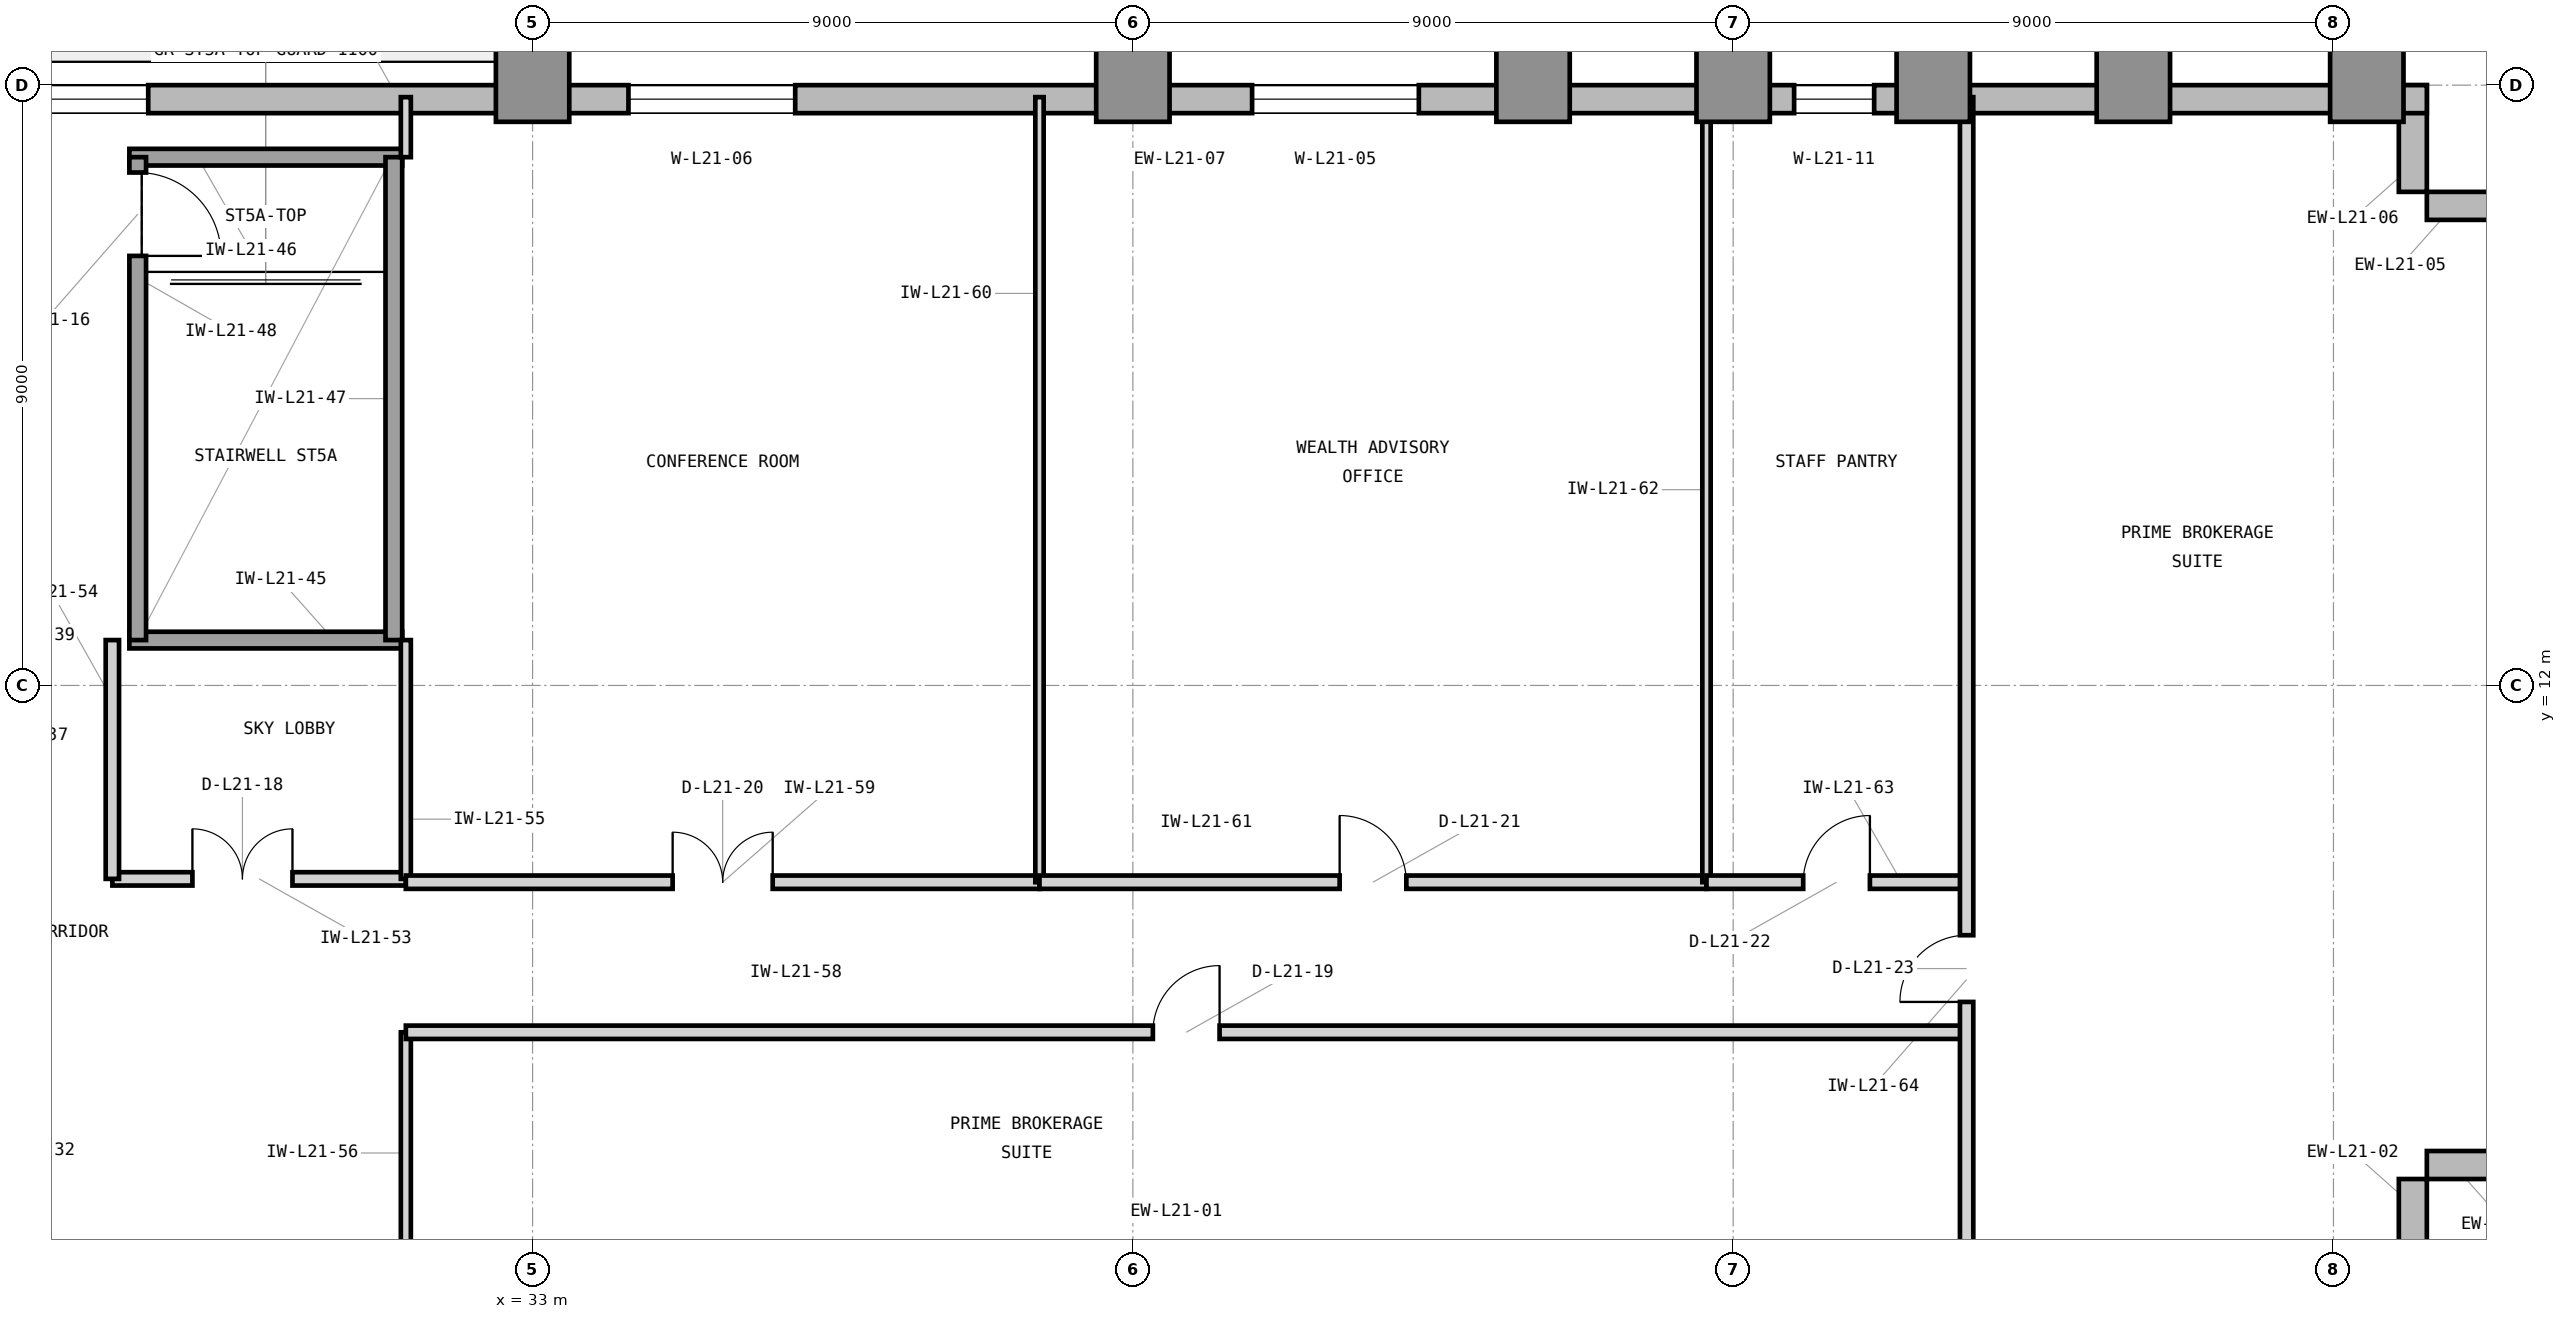
"""IFC4 building model, lengths in metres.
Left out: names, types, materials, properties, quantities, classifications, styles, units other than length and angle.
Written with IfcOpenShell. Run it as: python <this file> out.ifc"""

import sys

from ifc_helpers import new_model, si_unit, direction, frame, frame_2d, origin, origin_2d, place, context, subcontext, project, spatial, rectangle, extrude, element, fill, save


model = new_model("IFC4")
c1 = context("Model", 3, precision=1e-05, world=origin(), true_north=direction((0.0, 1.0)))
c2 = subcontext(c1, "Body", "Model", "MODEL_VIEW")
j1 = project(units=[si_unit("LENGTHUNIT", "METRE"), si_unit("PLANEANGLEUNIT", "RADIAN")], contexts=[c1])
p1 = place(None, origin())
s1 = spatial("IfcSite", under=j1, at=p1, CompositionType="ELEMENT")
p2 = place(p1, origin())
s2 = spatial("IfcBuilding", under=s1, at=p2, CompositionType="ELEMENT")
p3 = place(p2, frame((0.0, 0.0, 93.3)))
s3 = spatial("IfcBuildingStorey", under=s2, at=p3, CompositionType="ELEMENT", Elevation=93.3)
for number, where, z_axis, x_axis in (
    (1, (33.0, 21.0, 0.0), (0.0, 0.0, 1.0), (1.0, 0.0, 0.0)),
    (2, (42.0, 21.0, 0.0), (0.0, 0.0, 1.0), (1.0, 0.0, 0.0)),
    (3, (48.0, 21.0, 0.0), (0.0, 0.0, 1.0), (1.0, 0.0, 0.0)),
    (4, (51.0, 21.0, 0.0), (0.0, 0.0, 1.0), (1.0, 0.0, 0.0)),
    (5, (54.0, 21.0, 0.0), (0.0, 0.0, 1.0), (1.0, 0.0, 0.0)),
    (6, (57.0, 21.0, 0.0), (0.0, 0.0, 1.0), (1.0, 0.0, 0.0)),
    (7, (60.5, 21.0, 0.0), (0.0, 0.0, 1.0), (1.0, 0.0, 0.0)),
):
    element("IfcColumn", number, at=place(p3, frame(where, z_axis=z_axis, x_axis=x_axis)), inside=s3, PredefinedType="COLUMN", context=c2, shape_type="SweptSolid", body=[
        extrude(rectangle(XDim=1.1, YDim=1.1, at=origin_2d()), origin(), (0.0, 0.0, 1.0), 3.9),
    ])
for number, where, z_axis, x_axis in (
    (8, (61.19, 3.0, 0.0), (0.0, 0.0, 1.0), (0.0, 1.0, 0.0)),
    (9, (61.4, 4.81, 0.0), (0.0, 0.0, 1.0), (1.0, 0.0, 0.0)),
    (10, (63.0, 19.19, 0.0), (0.0, 0.0, 1.0), (-1.0, 0.0, 0.0)),
    (11, (61.19, 19.4, 0.0), (0.0, 0.0, 1.0), (0.0, 1.0, 0.0)),
):
    element("IfcWall", number, at=place(p3, frame(where, z_axis=z_axis, x_axis=x_axis)), inside=s3, PredefinedType="STANDARD", context=c2, shape_type="SweptSolid", body=[
        extrude(rectangle(XDim=1.6, YDim=0.42, at=frame_2d((0.8, 0.0))), origin(), (0.0, 0.0, 1.0), 3.7),
    ])
p4 = place(p3, frame((61.4, 20.79, 0.0), z_axis=(0.0, 0.0, 1.0), x_axis=(-1.0, 0.0, 0.0)))
e12 = element("IfcWall", 12, at=p4, inside=s3, PredefinedType="STANDARD", context=c2, shape_type="SweptSolid", body=[
    extrude(rectangle(XDim=37.4, YDim=0.42, at=frame_2d((18.7, 0.0))), origin(), (0.0, 0.0, 1.0), 3.7),
])
p5 = place(p4, frame((15.113, 0.0, 0.85)))
e13 = element("IfcOpeningElement", 13, at=p5, cuts=e12, PredefinedType="OPENING", context=c2, shape_type="SweptSolid", body=[
    extrude(rectangle(XDim=2.5, YDim=2.25, at=frame_2d((1.25, 1.125))), frame((0.0, 0.22, 0.0), z_axis=(0.0, -1.0, 0.0), x_axis=(1.0, 0.0, 0.0)), (0.0, 0.0, 1.0), 0.44),
])
p6 = place(p4, frame((24.462, 0.0, 0.85)))
e14 = element("IfcOpeningElement", 14, at=p6, cuts=e12, PredefinedType="OPENING", context=c2, shape_type="SweptSolid", body=[
    extrude(rectangle(XDim=2.5, YDim=2.25, at=frame_2d((1.25, 1.125))), frame((0.0, 0.22, 0.0), z_axis=(0.0, -1.0, 0.0), x_axis=(1.0, 0.0, 0.0)), (0.0, 0.0, 1.0), 0.44),
])
p7 = place(p4, frame((34.163, 0.0, 0.85)))
e15 = element("IfcOpeningElement", 15, at=p7, cuts=e12, PredefinedType="OPENING", context=c2, shape_type="SweptSolid", body=[
    extrude(rectangle(XDim=1.8, YDim=2.25, at=frame_2d((0.9, 1.125))), frame((0.0, 0.22, 0.0), z_axis=(0.0, -1.0, 0.0), x_axis=(1.0, 0.0, 0.0)), (0.0, 0.0, 1.0), 0.44),
])
p8 = place(p4, frame((8.286, 0.0, 0.85)))
e16 = element("IfcOpeningElement", 16, at=p8, cuts=e12, PredefinedType="OPENING", context=c2, shape_type="SweptSolid", body=[
    extrude(rectangle(XDim=1.2, YDim=2.25, at=frame_2d((0.6, 1.125))), frame((0.0, 0.22, 0.0), z_axis=(0.0, -1.0, 0.0), x_axis=(1.0, 0.0, 0.0)), (0.0, 0.0, 1.0), 0.44),
])
for number, where, z_axis, x_axis in (
    (17, (26.955, 12.68, 0.0), (0.0, 0.0, 1.0), (1.0, 0.0, 0.0)),
    (18, (26.955, 19.92, 0.0), (0.0, 0.0, 1.0), (1.0, 0.0, 0.0)),
):
    element("IfcWall", number, at=place(p3, frame(where, z_axis=z_axis, x_axis=x_axis)), inside=s3, PredefinedType="SHEAR", context=c2, shape_type="SweptSolid", body=[
        extrude(rectangle(XDim=4.09, YDim=0.25, at=frame_2d((2.045, 0.0))), origin(), (0.0, 0.0, 1.0), 3.9),
    ])
p9 = place(p3, frame((30.92, 12.68, 0.0), z_axis=(0.0, 0.0, 1.0), x_axis=(0.0, 1.0, 0.0)))
e19 = element("IfcWall", 19, at=p9, inside=s3, PredefinedType="SHEAR", context=c2, shape_type="SweptSolid", body=[
    extrude(rectangle(XDim=7.24, YDim=0.25, at=frame_2d((3.62, 0.0))), origin(), (0.0, 0.0, 1.0), 3.9),
])
p10 = place(p3, frame((27.08, 12.68, 0.0), z_axis=(0.0, 0.0, 1.0), x_axis=(0.0, 1.0, 0.0)))
e20 = element("IfcWall", 20, at=p10, inside=s3, PredefinedType="SHEAR", context=c2, shape_type="SweptSolid", body=[
    extrude(rectangle(XDim=7.24, YDim=0.25, at=frame_2d((3.62, 0.0))), origin(), (0.0, 0.0, 1.0), 3.9),
])
p11 = place(p10, frame((5.76, 0.0, 0.0)))
e21 = element("IfcOpeningElement", 21, at=p11, cuts=e20, PredefinedType="OPENING", context=c2, shape_type="SweptSolid", body=[
    extrude(rectangle(XDim=1.25, YDim=2.2, at=frame_2d((0.625, 1.1))), frame((0.0, 0.135, 0.0), z_axis=(0.0, -1.0, 0.0), x_axis=(1.0, 0.0, 0.0)), (0.0, 0.0, 1.0), 0.27),
])
p12 = place(p3, frame((26.7, 9.1, 0.0), z_axis=(0.0, 0.0, 1.0), x_axis=(1.0, 0.0, 0.0)))
e22 = element("IfcWall", 22, at=p12, inside=s3, PredefinedType="PARTITIONING", context=c2, shape_type="SweptSolid", body=[
    extrude(rectangle(XDim=4.4, YDim=0.2, at=frame_2d((2.2, 0.0))), origin(), (0.0, 0.0, 1.0), 3.69),
])
p13 = place(p12, frame((1.2, 0.0, 0.0)))
e23 = element("IfcOpeningElement", 23, at=p13, cuts=e22, PredefinedType="OPENING", context=c2, shape_type="SweptSolid", body=[
    extrude(rectangle(XDim=1.5, YDim=2.3, at=frame_2d((0.75, 1.15))), frame((0.0, 0.11, 0.0), z_axis=(0.0, -1.0, 0.0), x_axis=(1.0, 0.0, 0.0)), (0.0, 0.0, 1.0), 0.22),
])
p14 = place(p3, frame((26.7, 9.1, 0.0), z_axis=(0.0, 0.0, 1.0), x_axis=(0.0, 1.0, 0.0)))
e24 = element("IfcWall", 24, at=p14, inside=s3, PredefinedType="PARTITIONING", context=c2, shape_type="SweptSolid", body=[
    extrude(rectangle(XDim=3.58, YDim=0.2, at=frame_2d((1.79, 0.0))), origin(), (0.0, 0.0, 1.0), 3.69),
])
p15 = place(p3, frame((31.1, 9.1, 0.0), z_axis=(0.0, 0.0, 1.0), x_axis=(0.0, 1.0, 0.0)))
e25 = element("IfcWall", 25, at=p15, inside=s3, PredefinedType="PARTITIONING", context=c2, shape_type="SweptSolid", body=[
    extrude(rectangle(XDim=3.58, YDim=0.15, at=frame_2d((1.79, 0.0))), origin(), (0.0, 0.0, 1.0), 3.69),
])
p16 = place(p3, frame((31.1, 3.18, 0.0), z_axis=(0.0, 0.0, 1.0), x_axis=(0.0, 1.0, 0.0)))
e26 = element("IfcWall", 26, at=p16, inside=s3, PredefinedType="PARTITIONING", context=c2, shape_type="SweptSolid", body=[
    extrude(rectangle(XDim=3.62, YDim=0.15, at=frame_2d((1.81, 0.0))), origin(), (0.0, 0.0, 1.0), 3.69),
])
p17 = place(p3, frame((31.1, 19.92, 0.0), z_axis=(0.0, 0.0, 1.0), x_axis=(0.0, 1.0, 0.0)))
e27 = element("IfcWall", 27, at=p17, inside=s3, PredefinedType="PARTITIONING", context=c2, shape_type="SweptSolid", body=[
    extrude(rectangle(XDim=0.9, YDim=0.15, at=frame_2d((0.45, 0.0))), origin(), (0.0, 0.0, 1.0), 3.69),
])
p18 = place(p3, frame((31.1, 6.8, 0.0), z_axis=(0.0, 0.0, 1.0), x_axis=(1.0, 0.0, 0.0)))
e28 = element("IfcWall", 28, at=p18, inside=s3, PredefinedType="PARTITIONING", context=c2, shape_type="SweptSolid", body=[
    extrude(rectangle(XDim=23.4, YDim=0.2, at=frame_2d((11.7, 0.0))), origin(), (0.0, 0.0, 1.0), 3.69),
])
p19 = place(p18, frame((11.2, 0.0, 0.0)))
e29 = element("IfcOpeningElement", 29, at=p19, cuts=e28, PredefinedType="OPENING", context=c2, shape_type="SweptSolid", body=[
    extrude(rectangle(XDim=1.0, YDim=2.15, at=frame_2d((0.5, 1.075))), frame((0.0, 0.11, 0.0), z_axis=(0.0, -1.0, 0.0), x_axis=(1.0, 0.0, 0.0)), (0.0, 0.0, 1.0), 0.22),
])
p20 = place(p3, frame((31.1, 9.05, 0.0), z_axis=(0.0, 0.0, 1.0), x_axis=(1.0, 0.0, 0.0)))
e30 = element("IfcWall", 30, at=p20, inside=s3, PredefinedType="PARTITIONING", context=c2, shape_type="SweptSolid", body=[
    extrude(rectangle(XDim=9.5, YDim=0.2, at=frame_2d((4.75, 0.0))), origin(), (0.0, 0.0, 1.0), 3.227),
])
p21 = place(p20, frame((4.0, 0.0, 0.0)))
e31 = element("IfcOpeningElement", 31, at=p21, cuts=e30, PredefinedType="OPENING", context=c2, shape_type="SweptSolid", body=[
    extrude(rectangle(XDim=1.5, YDim=2.3, at=frame_2d((0.75, 1.15))), frame((0.0, 0.11, 0.0), z_axis=(0.0, -1.0, 0.0), x_axis=(1.0, 0.0, 0.0)), (0.0, 0.0, 1.0), 0.22),
])
p22 = place(p3, frame((40.6, 9.05, 0.0), z_axis=(0.0, 0.0, 1.0), x_axis=(0.0, 1.0, 0.0)))
e32 = element("IfcWall", 32, at=p22, inside=s3, PredefinedType="PARTITIONING", context=c2, shape_type="SweptSolid", body=[
    extrude(rectangle(XDim=11.77, YDim=0.125, at=frame_2d((5.885, 0.0))), origin(), (0.0, 0.0, 1.0), 3.69),
])
p23 = place(p3, frame((40.6, 9.05, 0.0), z_axis=(0.0, 0.0, 1.0), x_axis=(1.0, 0.0, 0.0)))
e33 = element("IfcWall", 33, at=p23, inside=s3, PredefinedType="PARTITIONING", context=c2, shape_type="SweptSolid", body=[
    extrude(rectangle(XDim=10.0, YDim=0.2, at=frame_2d((5.0, 0.0))), origin(), (0.0, 0.0, 1.0), 3.227),
])
p24 = place(p23, frame((4.5, 0.0, 0.0)))
e34 = element("IfcOpeningElement", 34, at=p24, cuts=e33, PredefinedType="OPENING", context=c2, shape_type="SweptSolid", body=[
    extrude(rectangle(XDim=1.0, YDim=2.15, at=frame_2d((0.5, 1.075))), frame((0.0, 0.11, 0.0), z_axis=(0.0, -1.0, 0.0), x_axis=(1.0, 0.0, 0.0)), (0.0, 0.0, 1.0), 0.22),
])
p25 = place(p3, frame((50.6, 9.05, 0.0), z_axis=(0.0, 0.0, 1.0), x_axis=(0.0, 1.0, 0.0)))
e35 = element("IfcWall", 35, at=p25, inside=s3, PredefinedType="PARTITIONING", context=c2, shape_type="SweptSolid", body=[
    extrude(rectangle(XDim=11.77, YDim=0.125, at=frame_2d((5.885, 0.0))), origin(), (0.0, 0.0, 1.0), 3.69),
])
p26 = place(p3, frame((50.6, 9.05, 0.0), z_axis=(0.0, 0.0, 1.0), x_axis=(1.0, 0.0, 0.0)))
e36 = element("IfcWall", 36, at=p26, inside=s3, PredefinedType="PARTITIONING", context=c2, shape_type="SweptSolid", body=[
    extrude(rectangle(XDim=3.9, YDim=0.2, at=frame_2d((1.95, 0.0))), origin(), (0.0, 0.0, 1.0), 3.227),
])
p27 = place(p26, frame((1.45, 0.0, 0.0)))
e37 = element("IfcOpeningElement", 37, at=p27, cuts=e36, PredefinedType="OPENING", context=c2, shape_type="SweptSolid", body=[
    extrude(rectangle(XDim=1.0, YDim=2.15, at=frame_2d((0.5, 1.075))), frame((0.0, 0.11, 0.0), z_axis=(0.0, -1.0, 0.0), x_axis=(1.0, 0.0, 0.0)), (0.0, 0.0, 1.0), 0.22),
])
p28 = place(p3, frame((54.5, 3.18, 0.0), z_axis=(0.0, 0.0, 1.0), x_axis=(0.0, 1.0, 0.0)))
e38 = element("IfcWall", 38, at=p28, inside=s3, PredefinedType="PARTITIONING", context=c2, shape_type="SweptSolid", body=[
    extrude(rectangle(XDim=17.64, YDim=0.2, at=frame_2d((8.82, 0.0))), origin(), (0.0, 0.0, 1.0), 3.69),
])
p29 = place(p28, frame((4.075, 0.0, 0.0)))
e39 = element("IfcOpeningElement", 39, at=p29, cuts=e38, PredefinedType="OPENING", context=c2, shape_type="SweptSolid", body=[
    extrude(rectangle(XDim=1.0, YDim=2.15, at=frame_2d((0.5, 1.075))), frame((0.0, 0.11, 0.0), z_axis=(0.0, -1.0, 0.0), x_axis=(1.0, 0.0, 0.0)), (0.0, 0.0, 1.0), 0.22),
])
p30 = place(p5, origin())
e40 = element("IfcWindow", 40, at=p30, inside=s3, PartitioningType="SINGLE_PANEL", PredefinedType="WINDOW", context=c2, shape_type="SweptSolid", body=[
    extrude(rectangle(XDim=2.5, YDim=2.25, at=frame_2d((1.25, 1.125))), frame((0.0, 0.11, 0.0), z_axis=(0.0, -1.0, 0.0), x_axis=(1.0, 0.0, 0.0)), (0.0, 0.0, 1.0), 0.06),
])
fill(e13, e40)
p31 = place(p6, origin())
e41 = element("IfcWindow", 41, at=p31, inside=s3, PartitioningType="SINGLE_PANEL", PredefinedType="WINDOW", context=c2, shape_type="SweptSolid", body=[
    extrude(rectangle(XDim=2.5, YDim=2.25, at=frame_2d((1.25, 1.125))), frame((0.0, 0.11, 0.0), z_axis=(0.0, -1.0, 0.0), x_axis=(1.0, 0.0, 0.0)), (0.0, 0.0, 1.0), 0.06),
])
fill(e14, e41)
p32 = place(p7, origin())
e42 = element("IfcWindow", 42, at=p32, inside=s3, PartitioningType="SINGLE_PANEL", PredefinedType="WINDOW", context=c2, shape_type="SweptSolid", body=[
    extrude(rectangle(XDim=1.8, YDim=2.25, at=frame_2d((0.9, 1.125))), frame((0.0, 0.11, 0.0), z_axis=(0.0, -1.0, 0.0), x_axis=(1.0, 0.0, 0.0)), (0.0, 0.0, 1.0), 0.06),
])
fill(e15, e42)
p33 = place(p11, frame((1.25, 0.0, 0.0), z_axis=(0.0, 0.0, 1.0), x_axis=(-1.0, 0.0, 0.0)))
e43 = element("IfcDoor", 43, at=p33, inside=s3, OperationType="SINGLE_SWING_RIGHT", PredefinedType="DOOR", context=c2, shape_type="SweptSolid", body=[
    extrude(rectangle(XDim=1.25, YDim=2.2, at=frame_2d((0.625, 1.1))), frame((0.0, 0.025, 0.0), z_axis=(0.0, -1.0, 0.0), x_axis=(1.0, 0.0, 0.0)), (0.0, 0.0, 1.0), 0.05),
])
fill(e21, e43)
p34 = place(p13, origin())
e44 = element("IfcDoor", 44, at=p34, inside=s3, OperationType="DOUBLE_DOOR_SINGLE_SWING", PredefinedType="DOOR", context=c2, shape_type="SweptSolid", body=[
    extrude(rectangle(XDim=1.5, YDim=2.3, at=frame_2d((0.75, 1.15))), frame((0.0, 0.025, 0.0), z_axis=(0.0, -1.0, 0.0), x_axis=(1.0, 0.0, 0.0)), (0.0, 0.0, 1.0), 0.05),
])
fill(e23, e44)
p35 = place(p19, origin())
e45 = element("IfcDoor", 45, at=p35, inside=s3, OperationType="SINGLE_SWING_RIGHT", PredefinedType="DOOR", context=c2, shape_type="SweptSolid", body=[
    extrude(rectangle(XDim=1.0, YDim=2.15, at=frame_2d((0.5, 1.075))), frame((0.0, 0.025, 0.0), z_axis=(0.0, -1.0, 0.0), x_axis=(1.0, 0.0, 0.0)), (0.0, 0.0, 1.0), 0.05),
])
fill(e29, e45)
p36 = place(p21, origin())
e46 = element("IfcDoor", 46, at=p36, inside=s3, OperationType="DOUBLE_DOOR_SINGLE_SWING", PredefinedType="DOOR", context=c2, shape_type="SweptSolid", body=[
    extrude(rectangle(XDim=1.5, YDim=2.3, at=frame_2d((0.75, 1.15))), frame((0.0, 0.025, 0.0), z_axis=(0.0, -1.0, 0.0), x_axis=(1.0, 0.0, 0.0)), (0.0, 0.0, 1.0), 0.05),
])
fill(e31, e46)
p37 = place(p24, origin())
e47 = element("IfcDoor", 47, at=p37, inside=s3, OperationType="SINGLE_SWING_LEFT", PredefinedType="DOOR", context=c2, shape_type="SweptSolid", body=[
    extrude(rectangle(XDim=1.0, YDim=2.15, at=frame_2d((0.5, 1.075))), frame((0.0, 0.025, 0.0), z_axis=(0.0, -1.0, 0.0), x_axis=(1.0, 0.0, 0.0)), (0.0, 0.0, 1.0), 0.05),
])
fill(e34, e47)
p38 = place(p27, origin())
e48 = element("IfcDoor", 48, at=p38, inside=s3, OperationType="SINGLE_SWING_RIGHT", PredefinedType="DOOR", context=c2, shape_type="SweptSolid", body=[
    extrude(rectangle(XDim=1.0, YDim=2.15, at=frame_2d((0.5, 1.075))), frame((0.0, 0.025, 0.0), z_axis=(0.0, -1.0, 0.0), x_axis=(1.0, 0.0, 0.0)), (0.0, 0.0, 1.0), 0.05),
])
fill(e37, e48)
p39 = place(p29, origin())
e49 = element("IfcDoor", 49, at=p39, inside=s3, OperationType="SINGLE_SWING_LEFT", PredefinedType="DOOR", context=c2, shape_type="SweptSolid", body=[
    extrude(rectangle(XDim=1.0, YDim=2.15, at=frame_2d((0.5, 1.075))), frame((0.0, 0.025, 0.0), z_axis=(0.0, -1.0, 0.0), x_axis=(1.0, 0.0, 0.0)), (0.0, 0.0, 1.0), 0.05),
])
fill(e39, e49)
p40 = place(p8, origin())
e50 = element("IfcWindow", 50, at=p40, inside=s3, PartitioningType="SINGLE_PANEL", PredefinedType="WINDOW", context=c2, shape_type="SweptSolid", body=[
    extrude(rectangle(XDim=1.2, YDim=2.25, at=frame_2d((0.6, 1.125))), frame((0.0, 0.11, 0.0), z_axis=(0.0, -1.0, 0.0), x_axis=(1.0, 0.0, 0.0)), (0.0, 0.0, 1.0), 0.06),
])
fill(e16, e50)
save(model, sys.argv[1])
